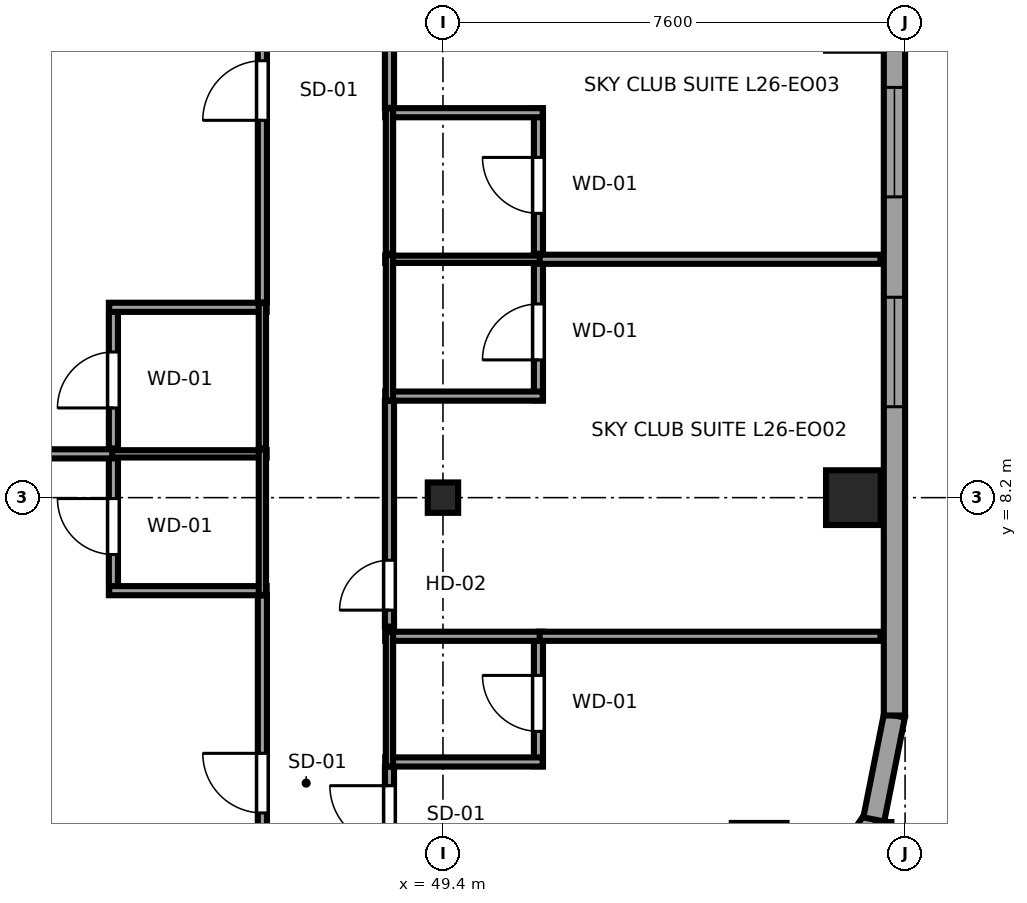
"""IFC4 building model, lengths in metres.
Left out: names, types, materials, properties, quantities, classifications, styles, units other than length and angle.
Written with IfcOpenShell. Run it as: python <this file> out.ifc"""

import sys

from ifc_helpers import new_model, si_unit, direction, frame, frame_2d, origin, origin_2d, place, context, subcontext, project, spatial, rectangle, i_section, extrude, source, transform, mapped, element, fill, save


model = new_model("IFC4")
c1 = context("Model", 3, precision=1e-05, world=origin(), true_north=direction((0.0, 1.0)))
c2 = subcontext(c1, "Body", "Model", "MODEL_VIEW")
j1 = project(units=[si_unit("LENGTHUNIT", "METRE"), si_unit("PLANEANGLEUNIT", "RADIAN")], contexts=[c1])
p1 = place(None, origin())
s1 = spatial("IfcSite", under=j1, at=p1, CompositionType="ELEMENT")
p2 = place(p1, origin())
s2 = spatial("IfcBuilding", under=s1, at=p2, CompositionType="ELEMENT")
p3 = place(p2, frame((0.0, 0.0, 104.45)))
s3 = spatial("IfcBuildingStorey", under=s2, at=p3, CompositionType="ELEMENT", Elevation=104.45)
m1 = source(origin(), c2, "Body", "SweptSolid", [
    extrude(i_section(OverallWidth=0.5, OverallDepth=0.5, WebThickness=0.022, FlangeThickness=0.034, at=origin_2d()), origin(), (0.0, 0.0, 1.0), 3.55),
])
p4 = place(p3, frame((49.4, 8.2, 0.0), z_axis=(0.0, 0.0, 1.0), x_axis=(1.0, 0.0, 0.0)))
e1 = element("IfcColumn", 1, at=p4, inside=s3, PredefinedType="COLUMN", context=c2, shape_type="MappedRepresentation", body=[
    mapped(m1, transform((0.0, 0.0, 0.0), x_axis=(1.0, 0.0, 0.0), y_axis=(0.0, 1.0, 0.0), z_axis=(0.0, 0.0, 1.0), scale=1.0)),
])
m2 = source(origin(), c2, "Body", "SweptSolid", [
    extrude(rectangle(XDim=0.9, YDim=0.9, at=origin_2d()), origin(), (0.0, 0.0, 1.0), 3.55),
])
p5 = place(p3, frame((56.15, 8.2, 0.0), z_axis=(0.0, 0.0, 1.0), x_axis=(1.0, 0.0, 0.0)))
e2 = element("IfcColumn", 2, at=p5, inside=s3, PredefinedType="COLUMN", context=c2, shape_type="MappedRepresentation", body=[
    mapped(m2, transform((0.0, 0.0, 0.0), x_axis=(1.0, 0.0, 0.0), y_axis=(0.0, 1.0, 0.0), z_axis=(0.0, 0.0, 1.0), scale=1.0)),
])
p6 = place(p3, frame((55.527, 1.473, 0.0), z_axis=(0.0, 0.0, 1.0), x_axis=(0.55554893791, 0.831483840845, 0.0)))
e3 = element("IfcWall", 3, at=p6, inside=s3, PredefinedType="SOLIDWALL", context=c2, shape_type="SweptSolid", body=[
    extrude(rectangle(XDim=1.725, YDim=0.35, at=frame_2d((0.863, 0.0))), origin(), (0.0, 0.0, 1.0), 2.832),
])
p7 = place(p3, frame((56.485, 2.908, 0.0), z_axis=(0.0, 0.0, 1.0), x_axis=(0.195011420161, 0.980800971659, 0.0)))
e4 = element("IfcWall", 4, at=p7, inside=s3, PredefinedType="SOLIDWALL", context=c2, shape_type="SweptSolid", body=[
    extrude(rectangle(XDim=1.743, YDim=0.35, at=frame_2d((0.871, 0.0))), origin(), (0.0, 0.0, 1.0), 3.37),
])
p8 = place(p3, frame((56.825, 4.617, 0.0), z_axis=(0.0, 0.0, 1.0), x_axis=(0.0, 1.0, 0.0)))
e5 = element("IfcWall", 5, at=p8, inside=s3, PredefinedType="SOLIDWALL", context=c2, shape_type="SweptSolid", body=[
    extrude(rectangle(XDim=36.766, YDim=0.35, at=frame_2d((18.383, 0.0))), origin(), (0.0, 0.0, 1.0), 3.37),
])
p9 = place(p8, frame((5.078, 0.0, 0.68)))
e6 = element("IfcOpeningElement", 6, at=p9, cuts=e5, PredefinedType="OPENING", context=c2, shape_type="SweptSolid", body=[
    extrude(rectangle(XDim=1.8, YDim=1.85, at=frame_2d((0.9, 0.925))), frame((0.0, 0.185, 0.0), z_axis=(0.0, -1.0, 0.0), x_axis=(1.0, 0.0, 0.0)), (0.0, 0.0, 1.0), 0.37),
])
p10 = place(p8, frame((8.529, 0.0, 0.68)))
e7 = element("IfcOpeningElement", 7, at=p10, cuts=e5, PredefinedType="OPENING", context=c2, shape_type="SweptSolid", body=[
    extrude(rectangle(XDim=1.8, YDim=1.85, at=frame_2d((0.9, 0.925))), frame((0.0, 0.185, 0.0), z_axis=(0.0, -1.0, 0.0), x_axis=(1.0, 0.0, 0.0)), (0.0, 0.0, 1.0), 0.37),
])
p11 = place(p8, frame((14.081, 0.0, 0.68)))
e8 = element("IfcOpeningElement", 8, at=p11, cuts=e5, PredefinedType="OPENING", context=c2, shape_type="SweptSolid", body=[
    extrude(rectangle(XDim=1.8, YDim=1.85, at=frame_2d((0.9, 0.925))), frame((0.0, 0.185, 0.0), z_axis=(0.0, -1.0, 0.0), x_axis=(1.0, 0.0, 0.0)), (0.0, 0.0, 1.0), 0.37),
])
p12 = place(p8, frame((16.933, 0.0, 0.68)))
e9 = element("IfcOpeningElement", 9, at=p12, cuts=e5, PredefinedType="OPENING", context=c2, shape_type="SweptSolid", body=[
    extrude(rectangle(XDim=1.8, YDim=1.85, at=frame_2d((0.9, 0.925))), frame((0.0, 0.185, 0.0), z_axis=(0.0, -1.0, 0.0), x_axis=(1.0, 0.0, 0.0)), (0.0, 0.0, 1.0), 0.37),
])
p13 = place(p8, frame((21.435, 0.0, 0.68)))
e10 = element("IfcOpeningElement", 10, at=p13, cuts=e5, PredefinedType="OPENING", context=c2, shape_type="SweptSolid", body=[
    extrude(rectangle(XDim=1.8, YDim=1.85, at=frame_2d((0.9, 0.925))), frame((0.0, 0.185, 0.0), z_axis=(0.0, -1.0, 0.0), x_axis=(1.0, 0.0, 0.0)), (0.0, 0.0, 1.0), 0.37),
])
p14 = place(p8, frame((25.386, 0.0, 0.68)))
e11 = element("IfcOpeningElement", 11, at=p14, cuts=e5, PredefinedType="OPENING", context=c2, shape_type="SweptSolid", body=[
    extrude(rectangle(XDim=1.8, YDim=1.85, at=frame_2d((0.9, 0.925))), frame((0.0, 0.185, 0.0), z_axis=(0.0, -1.0, 0.0), x_axis=(1.0, 0.0, 0.0)), (0.0, 0.0, 1.0), 0.37),
])
p15 = place(p8, frame((33.29, 0.0, 0.68)))
e12 = element("IfcOpeningElement", 12, at=p15, cuts=e5, PredefinedType="OPENING", context=c2, shape_type="SweptSolid", body=[
    extrude(rectangle(XDim=1.8, YDim=1.85, at=frame_2d((0.9, 0.925))), frame((0.0, 0.185, 0.0), z_axis=(0.0, -1.0, 0.0), x_axis=(1.0, 0.0, 0.0)), (0.0, 0.0, 1.0), 0.37),
])
p16 = place(p3, frame((43.98, 6.6, 0.0), z_axis=(0.0, 0.0, 1.0), x_axis=(0.0, 1.0, 0.0)))
e13 = element("IfcWall", 13, at=p16, inside=s3, PredefinedType="PARTITIONING", context=c2, shape_type="SweptSolid", body=[
    extrude(rectangle(XDim=2.39, YDim=0.15, at=frame_2d((1.195, 0.0))), origin(), (0.0, 0.0, 1.0), 3.37),
])
p17 = place(p16, frame((0.665, 0.0, 0.0)))
e14 = element("IfcOpeningElement", 14, at=p17, cuts=e13, PredefinedType="OPENING", context=c2, shape_type="SweptSolid", body=[
    extrude(rectangle(XDim=0.92, YDim=2.01, at=frame_2d((0.46, 1.005))), frame((0.0, 0.085, 0.0), z_axis=(0.0, -1.0, 0.0), x_axis=(1.0, 0.0, 0.0)), (0.0, 0.0, 1.0), 0.17),
])
p18 = place(p3, frame((43.91, 6.67, 0.0), z_axis=(0.0, 0.0, 1.0), x_axis=(1.0, 0.0, 0.0)))
e15 = element("IfcWall", 15, at=p18, inside=s3, PredefinedType="PARTITIONING", context=c2, shape_type="SweptSolid", body=[
    extrude(rectangle(XDim=2.59, YDim=0.15, at=frame_2d((1.295, 0.0))), origin(), (0.0, 0.0, 1.0), 3.37),
])
p19 = place(p3, frame((43.91, 8.92, 0.0), z_axis=(0.0, 0.0, 1.0), x_axis=(1.0, 0.0, 0.0)))
e16 = element("IfcWall", 16, at=p19, inside=s3, PredefinedType="PLUMBINGWALL", context=c2, shape_type="SweptSolid", body=[
    extrude(rectangle(XDim=2.59, YDim=0.12, at=frame_2d((1.295, 0.0))), origin(), (0.0, 0.0, 1.0), 3.37),
])
p20 = place(p3, frame((46.43, 6.6, 0.0), z_axis=(0.0, 0.0, 1.0), x_axis=(0.0, 1.0, 0.0)))
e17 = element("IfcWall", 17, at=p20, inside=s3, PredefinedType="PLUMBINGWALL", context=c2, shape_type="SweptSolid", body=[
    extrude(rectangle(XDim=2.39, YDim=0.12, at=frame_2d((1.195, 0.0))), origin(), (0.0, 0.0, 1.0), 3.37),
])
p21 = place(p3, frame((43.98, 9.01, 0.0), z_axis=(0.0, 0.0, 1.0), x_axis=(0.0, 1.0, 0.0)))
e18 = element("IfcWall", 18, at=p21, inside=s3, PredefinedType="PARTITIONING", context=c2, shape_type="SweptSolid", body=[
    extrude(rectangle(XDim=2.39, YDim=0.15, at=frame_2d((1.195, 0.0))), origin(), (0.0, 0.0, 1.0), 3.37),
])
p22 = place(p21, frame((0.665, 0.0, 0.0)))
e19 = element("IfcOpeningElement", 19, at=p22, cuts=e18, PredefinedType="OPENING", context=c2, shape_type="SweptSolid", body=[
    extrude(rectangle(XDim=0.92, YDim=2.01, at=frame_2d((0.46, 1.005))), frame((0.0, 0.085, 0.0), z_axis=(0.0, -1.0, 0.0), x_axis=(1.0, 0.0, 0.0)), (0.0, 0.0, 1.0), 0.17),
])
p23 = place(p3, frame((43.91, 11.33, 0.0), z_axis=(0.0, 0.0, 1.0), x_axis=(1.0, 0.0, 0.0)))
e20 = element("IfcWall", 20, at=p23, inside=s3, PredefinedType="PARTITIONING", context=c2, shape_type="SweptSolid", body=[
    extrude(rectangle(XDim=2.59, YDim=0.15, at=frame_2d((1.295, 0.0))), origin(), (0.0, 0.0, 1.0), 3.37),
])
p24 = place(p3, frame((46.43, 9.01, 0.0), z_axis=(0.0, 0.0, 1.0), x_axis=(0.0, 1.0, 0.0)))
e21 = element("IfcWall", 21, at=p24, inside=s3, PredefinedType="PLUMBINGWALL", context=c2, shape_type="SweptSolid", body=[
    extrude(rectangle(XDim=2.39, YDim=0.12, at=frame_2d((1.195, 0.0))), origin(), (0.0, 0.0, 1.0), 3.37),
])
p25 = place(p3, frame((50.97, 3.783, 0.0), z_axis=(0.0, 0.0, 1.0), x_axis=(0.0, 1.0, 0.0)))
e22 = element("IfcWall", 22, at=p25, inside=s3, PredefinedType="PARTITIONING", context=c2, shape_type="SweptSolid", body=[
    extrude(rectangle(XDim=2.207, YDim=0.15, at=frame_2d((1.104, 0.0))), origin(), (0.0, 0.0, 1.0), 3.37),
])
p26 = place(p25, frame((0.573, 0.0, 0.0)))
e23 = element("IfcOpeningElement", 23, at=p26, cuts=e22, PredefinedType="OPENING", context=c2, shape_type="SweptSolid", body=[
    extrude(rectangle(XDim=0.92, YDim=2.01, at=frame_2d((0.46, 1.005))), frame((0.0, 0.085, 0.0), z_axis=(0.0, -1.0, 0.0), x_axis=(1.0, 0.0, 0.0)), (0.0, 0.0, 1.0), 0.17),
])
for number, where, z_axis, x_axis in (
    (24, (48.45, 3.853, 0.0), (0.0, 0.0, 1.0), (1.0, 0.0, 0.0)),
    (25, (48.45, 5.92, 0.0), (0.0, 0.0, 1.0), (1.0, 0.0, 0.0)),
):
    element("IfcWall", number, at=place(p3, frame(where, z_axis=z_axis, x_axis=x_axis)), inside=s3, PredefinedType="PARTITIONING", context=c2, shape_type="SweptSolid", body=[
        extrude(rectangle(XDim=2.59, YDim=0.15, at=frame_2d((1.295, 0.0))), origin(), (0.0, 0.0, 1.0), 3.37),
    ])
p27 = place(p3, frame((48.52, 3.783, 0.0), z_axis=(0.0, 0.0, 1.0), x_axis=(0.0, 1.0, 0.0)))
e26 = element("IfcWall", 26, at=p27, inside=s3, PredefinedType="PLUMBINGWALL", context=c2, shape_type="SweptSolid", body=[
    extrude(rectangle(XDim=2.207, YDim=0.12, at=frame_2d((1.104, 0.0))), origin(), (0.0, 0.0, 1.0), 3.37),
])
p28 = place(p3, frame((50.97, 9.8, 0.0), z_axis=(0.0, 0.0, 1.0), x_axis=(0.0, 1.0, 0.0)))
e27 = element("IfcWall", 27, at=p28, inside=s3, PredefinedType="PARTITIONING", context=c2, shape_type="SweptSolid", body=[
    extrude(rectangle(XDim=2.39, YDim=0.15, at=frame_2d((1.195, 0.0))), origin(), (0.0, 0.0, 1.0), 3.37),
])
p29 = place(p28, frame((0.665, 0.0, 0.0)))
e28 = element("IfcOpeningElement", 28, at=p29, cuts=e27, PredefinedType="OPENING", context=c2, shape_type="SweptSolid", body=[
    extrude(rectangle(XDim=0.92, YDim=2.01, at=frame_2d((0.46, 1.005))), frame((0.0, 0.085, 0.0), z_axis=(0.0, -1.0, 0.0), x_axis=(1.0, 0.0, 0.0)), (0.0, 0.0, 1.0), 0.17),
])
p30 = place(p3, frame((48.45, 9.87, 0.0), z_axis=(0.0, 0.0, 1.0), x_axis=(1.0, 0.0, 0.0)))
e29 = element("IfcWall", 29, at=p30, inside=s3, PredefinedType="PARTITIONING", context=c2, shape_type="SweptSolid", body=[
    extrude(rectangle(XDim=2.59, YDim=0.15, at=frame_2d((1.295, 0.0))), origin(), (0.0, 0.0, 1.0), 3.37),
])
p31 = place(p3, frame((48.45, 12.12, 0.0), z_axis=(0.0, 0.0, 1.0), x_axis=(1.0, 0.0, 0.0)))
e30 = element("IfcWall", 30, at=p31, inside=s3, PredefinedType="PLUMBINGWALL", context=c2, shape_type="SweptSolid", body=[
    extrude(rectangle(XDim=2.59, YDim=0.12, at=frame_2d((1.295, 0.0))), origin(), (0.0, 0.0, 1.0), 3.37),
])
p32 = place(p3, frame((48.52, 9.8, 0.0), z_axis=(0.0, 0.0, 1.0), x_axis=(0.0, 1.0, 0.0)))
e31 = element("IfcWall", 31, at=p32, inside=s3, PredefinedType="PLUMBINGWALL", context=c2, shape_type="SweptSolid", body=[
    extrude(rectangle(XDim=2.39, YDim=0.12, at=frame_2d((1.195, 0.0))), origin(), (0.0, 0.0, 1.0), 3.37),
])
p33 = place(p3, frame((50.97, 12.21, 0.0), z_axis=(0.0, 0.0, 1.0), x_axis=(0.0, 1.0, 0.0)))
e32 = element("IfcWall", 32, at=p33, inside=s3, PredefinedType="PARTITIONING", context=c2, shape_type="SweptSolid", body=[
    extrude(rectangle(XDim=2.39, YDim=0.15, at=frame_2d((1.195, 0.0))), origin(), (0.0, 0.0, 1.0), 3.37),
])
p34 = place(p33, frame((0.665, 0.0, 0.0)))
e33 = element("IfcOpeningElement", 33, at=p34, cuts=e32, PredefinedType="OPENING", context=c2, shape_type="SweptSolid", body=[
    extrude(rectangle(XDim=0.92, YDim=2.01, at=frame_2d((0.46, 1.005))), frame((0.0, 0.085, 0.0), z_axis=(0.0, -1.0, 0.0), x_axis=(1.0, 0.0, 0.0)), (0.0, 0.0, 1.0), 0.17),
])
p35 = place(p3, frame((48.45, 14.53, 0.0), z_axis=(0.0, 0.0, 1.0), x_axis=(1.0, 0.0, 0.0)))
e34 = element("IfcWall", 34, at=p35, inside=s3, PredefinedType="PARTITIONING", context=c2, shape_type="SweptSolid", body=[
    extrude(rectangle(XDim=2.59, YDim=0.15, at=frame_2d((1.295, 0.0))), origin(), (0.0, 0.0, 1.0), 3.37),
])
p36 = place(p3, frame((48.52, 12.21, 0.0), z_axis=(0.0, 0.0, 1.0), x_axis=(0.0, 1.0, 0.0)))
e35 = element("IfcWall", 35, at=p36, inside=s3, PredefinedType="PLUMBINGWALL", context=c2, shape_type="SweptSolid", body=[
    extrude(rectangle(XDim=2.39, YDim=0.12, at=frame_2d((1.195, 0.0))), origin(), (0.0, 0.0, 1.0), 3.37),
])
p37 = place(p3, frame((46.43, 0.405, 0.0), z_axis=(0.0, 0.0, 1.0), x_axis=(0.0, 1.0, 0.0)))
e36 = element("IfcWall", 36, at=p37, inside=s3, PredefinedType="PARTITIONING", context=c2, shape_type="SweptSolid", body=[
    extrude(rectangle(XDim=6.185, YDim=0.15, at=frame_2d((3.093, 0.0))), origin(), (0.0, 0.0, 1.0), 3.37),
])
p38 = place(p37, frame((2.61, 0.0, 0.0)))
e37 = element("IfcOpeningElement", 37, at=p38, cuts=e36, PredefinedType="OPENING", context=c2, shape_type="SweptSolid", body=[
    extrude(rectangle(XDim=0.98, YDim=2.12, at=frame_2d((0.49, 1.06))), frame((0.0, 0.085, 0.0), z_axis=(0.0, -1.0, 0.0), x_axis=(1.0, 0.0, 0.0)), (0.0, 0.0, 1.0), 0.17),
])
p39 = place(p3, frame((34.65, 8.92, 0.0), z_axis=(0.0, 0.0, 1.0), x_axis=(1.0, 0.0, 0.0)))
e38 = element("IfcWall", 38, at=p39, inside=s3, PredefinedType="PARTITIONING", context=c2, shape_type="SweptSolid", body=[
    extrude(rectangle(XDim=9.31, YDim=0.15, at=frame_2d((4.655, 0.0))), origin(), (0.0, 0.0, 1.0), 3.37),
])
p40 = place(p3, frame((46.43, 11.41, 0.0), z_axis=(0.0, 0.0, 1.0), x_axis=(0.0, 1.0, 0.0)))
e39 = element("IfcWall", 39, at=p40, inside=s3, PredefinedType="PARTITIONING", context=c2, shape_type="SweptSolid", body=[
    extrude(rectangle(XDim=7.01, YDim=0.15, at=frame_2d((3.505, 0.0))), origin(), (0.0, 0.0, 1.0), 3.37),
])
p41 = place(p40, frame((2.995, 0.0, 0.0)))
e40 = element("IfcOpeningElement", 40, at=p41, cuts=e39, PredefinedType="OPENING", context=c2, shape_type="SweptSolid", body=[
    extrude(rectangle(XDim=0.98, YDim=2.12, at=frame_2d((0.49, 1.06))), frame((0.0, 0.085, 0.0), z_axis=(0.0, -1.0, 0.0), x_axis=(1.0, 0.0, 0.0)), (0.0, 0.0, 1.0), 0.17),
])
p42 = place(p3, frame((48.52, 0.405, 0.0), z_axis=(0.0, 0.0, 1.0), x_axis=(0.0, 1.0, 0.0)))
e41 = element("IfcWall", 41, at=p42, inside=s3, PredefinedType="PARTITIONING", context=c2, shape_type="SweptSolid", body=[
    extrude(rectangle(XDim=3.368, YDim=0.15, at=frame_2d((1.684, 0.0))), origin(), (0.0, 0.0, 1.0), 3.37),
])
p43 = place(p42, frame((2.078, 0.0, 0.0)))
e42 = element("IfcOpeningElement", 42, at=p43, cuts=e41, PredefinedType="OPENING", context=c2, shape_type="SweptSolid", body=[
    extrude(rectangle(XDim=0.98, YDim=2.12, at=frame_2d((0.49, 1.06))), frame((0.0, 0.085, 0.0), z_axis=(0.0, -1.0, 0.0), x_axis=(1.0, 0.0, 0.0)), (0.0, 0.0, 1.0), 0.17),
])
p44 = place(p3, frame((56.7, 0.48, 0.0), z_axis=(0.0, 0.0, 1.0), x_axis=(0.0, 1.0, 0.0)))
e43 = element("IfcWall", 43, at=p44, inside=s3, PredefinedType="PARTITIONING", context=c2, shape_type="SweptSolid", body=[
    extrude(rectangle(XDim=2.385, YDim=0.15, at=frame_2d((1.192, 0.0))), origin(), (0.0, 0.0, 1.0), 3.37),
])
p45 = place(p3, frame((50.99, 5.92, 0.0), z_axis=(0.0, 0.0, 1.0), x_axis=(1.0, 0.0, 0.0)))
e44 = element("IfcWall", 44, at=p45, inside=s3, PredefinedType="PARTITIONING", context=c2, shape_type="SweptSolid", body=[
    extrude(rectangle(XDim=5.605, YDim=0.15, at=frame_2d((2.802, 0.0))), origin(), (0.0, 0.0, 1.0), 3.37),
])
p46 = place(p3, frame((48.52, 6.08, 0.0), z_axis=(0.0, 0.0, 1.0), x_axis=(0.0, 1.0, 0.0)))
e45 = element("IfcWall", 45, at=p46, inside=s3, PredefinedType="PARTITIONING", context=c2, shape_type="SweptSolid", body=[
    extrude(rectangle(XDim=3.71, YDim=0.15, at=frame_2d((1.855, 0.0))), origin(), (0.0, 0.0, 1.0), 3.37),
])
p47 = place(p46, frame((0.27, 0.0, 0.0)))
e46 = element("IfcOpeningElement", 46, at=p47, cuts=e45, PredefinedType="OPENING", context=c2, shape_type="SweptSolid", body=[
    extrude(rectangle(XDim=0.82, YDim=2.01, at=frame_2d((0.41, 1.005))), frame((0.0, 0.085, 0.0), z_axis=(0.0, -1.0, 0.0), x_axis=(1.0, 0.0, 0.0)), (0.0, 0.0, 1.0), 0.17),
])
p48 = place(p3, frame((50.99, 12.12, 0.0), z_axis=(0.0, 0.0, 1.0), x_axis=(1.0, 0.0, 0.0)))
e47 = element("IfcWall", 47, at=p48, inside=s3, PredefinedType="PARTITIONING", context=c2, shape_type="SweptSolid", body=[
    extrude(rectangle(XDim=5.605, YDim=0.15, at=frame_2d((2.802, 0.0))), origin(), (0.0, 0.0, 1.0), 3.37),
])
p49 = place(p3, frame((48.52, 14.61, 0.0), z_axis=(0.0, 0.0, 1.0), x_axis=(0.0, 1.0, 0.0)))
e48 = element("IfcWall", 48, at=p49, inside=s3, PredefinedType="PARTITIONING", context=c2, shape_type="SweptSolid", body=[
    extrude(rectangle(XDim=3.81, YDim=0.15, at=frame_2d((1.905, 0.0))), origin(), (0.0, 0.0, 1.0), 3.37),
])
p50 = place(p49, frame((2.52, 0.0, 0.0)))
e49 = element("IfcOpeningElement", 49, at=p50, cuts=e48, PredefinedType="OPENING", context=c2, shape_type="SweptSolid", body=[
    extrude(rectangle(XDim=0.98, YDim=2.12, at=frame_2d((0.49, 1.06))), frame((0.0, 0.085, 0.0), z_axis=(0.0, -1.0, 0.0), x_axis=(1.0, 0.0, 0.0)), (0.0, 0.0, 1.0), 0.17),
])
m3 = source(origin(), c2, "Body", "SweptSolid", [
    extrude(rectangle(XDim=1.8, YDim=1.85, at=frame_2d((0.9, 0.925))), frame((0.0, 0.09, 0.0), z_axis=(0.0, -1.0, 0.0), x_axis=(1.0, 0.0, 0.0)), (0.0, 0.0, 1.0), 0.06),
])
p51 = place(p9, origin())
e50 = element("IfcWindow", 50, at=p51, inside=s3, PartitioningType="TRIPLE_PANEL_HORIZONTAL", PredefinedType="WINDOW", context=c2, shape_type="MappedRepresentation", body=[
    mapped(m3, transform((0.0, 0.0, 0.0), x_axis=(1.0, 0.0, 0.0), y_axis=(0.0, 1.0, 0.0), z_axis=(0.0, 0.0, 1.0), scale=1.0)),
])
fill(e6, e50)
p52 = place(p10, origin())
e51 = element("IfcWindow", 51, at=p52, inside=s3, PartitioningType="TRIPLE_PANEL_HORIZONTAL", PredefinedType="WINDOW", context=c2, shape_type="MappedRepresentation", body=[
    mapped(m3, transform((0.0, 0.0, 0.0), x_axis=(1.0, 0.0, 0.0), y_axis=(0.0, 1.0, 0.0), z_axis=(0.0, 0.0, 1.0), scale=1.0)),
])
fill(e7, e51)
m4 = source(origin(), c2, "Body", "SweptSolid", [
    extrude(rectangle(XDim=0.92, YDim=2.01, at=frame_2d((0.46, 1.005))), frame((0.0, 0.025, 0.0), z_axis=(0.0, -1.0, 0.0), x_axis=(1.0, 0.0, 0.0)), (0.0, 0.0, 1.0), 0.05),
])
p53 = place(p17, origin())
e52 = element("IfcDoor", 52, at=p53, inside=s3, OperationType="SINGLE_SWING_RIGHT", PredefinedType="DOOR", context=c2, shape_type="MappedRepresentation", body=[
    mapped(m4, transform((0.0, 0.0, 0.0), x_axis=(1.0, 0.0, 0.0), y_axis=(0.0, 1.0, 0.0), z_axis=(0.0, 0.0, 1.0), scale=1.0)),
])
fill(e14, e52)
p54 = place(p22, origin())
e53 = element("IfcDoor", 53, at=p54, inside=s3, OperationType="SINGLE_SWING_LEFT", PredefinedType="DOOR", context=c2, shape_type="MappedRepresentation", body=[
    mapped(m4, transform((0.0, 0.0, 0.0), x_axis=(1.0, 0.0, 0.0), y_axis=(0.0, 1.0, 0.0), z_axis=(0.0, 0.0, 1.0), scale=1.0)),
])
fill(e19, e53)
p55 = place(p26, origin())
e54 = element("IfcDoor", 54, at=p55, inside=s3, OperationType="SINGLE_SWING_RIGHT", PredefinedType="DOOR", context=c2, shape_type="MappedRepresentation", body=[
    mapped(m4, transform((0.0, 0.0, 0.0), x_axis=(1.0, 0.0, 0.0), y_axis=(0.0, 1.0, 0.0), z_axis=(0.0, 0.0, 1.0), scale=1.0)),
])
fill(e23, e54)
p56 = place(p29, origin())
e55 = element("IfcDoor", 55, at=p56, inside=s3, OperationType="SINGLE_SWING_LEFT", PredefinedType="DOOR", context=c2, shape_type="MappedRepresentation", body=[
    mapped(m4, transform((0.0, 0.0, 0.0), x_axis=(1.0, 0.0, 0.0), y_axis=(0.0, 1.0, 0.0), z_axis=(0.0, 0.0, 1.0), scale=1.0)),
])
fill(e28, e55)
p57 = place(p34, origin())
e56 = element("IfcDoor", 56, at=p57, inside=s3, OperationType="SINGLE_SWING_RIGHT", PredefinedType="DOOR", context=c2, shape_type="MappedRepresentation", body=[
    mapped(m4, transform((0.0, 0.0, 0.0), x_axis=(1.0, 0.0, 0.0), y_axis=(0.0, 1.0, 0.0), z_axis=(0.0, 0.0, 1.0), scale=1.0)),
])
fill(e33, e56)
m5 = source(origin(), c2, "Body", "SweptSolid", [
    extrude(rectangle(XDim=0.98, YDim=2.12, at=frame_2d((0.49, 1.06))), frame((0.0, 0.025, 0.0), z_axis=(0.0, -1.0, 0.0), x_axis=(1.0, 0.0, 0.0)), (0.0, 0.0, 1.0), 0.05),
])
p58 = place(p38, origin())
e57 = element("IfcDoor", 57, at=p58, inside=s3, OperationType="SINGLE_SWING_RIGHT", PredefinedType="DOOR", context=c2, shape_type="MappedRepresentation", body=[
    mapped(m5, transform((0.0, 0.0, 0.0), x_axis=(1.0, 0.0, 0.0), y_axis=(0.0, 1.0, 0.0), z_axis=(0.0, 0.0, 1.0), scale=1.0)),
])
fill(e37, e57)
p59 = place(p41, origin())
e58 = element("IfcDoor", 58, at=p59, inside=s3, OperationType="SINGLE_SWING_LEFT", PredefinedType="DOOR", context=c2, shape_type="MappedRepresentation", body=[
    mapped(m5, transform((0.0, 0.0, 0.0), x_axis=(1.0, 0.0, 0.0), y_axis=(0.0, 1.0, 0.0), z_axis=(0.0, 0.0, 1.0), scale=1.0)),
])
fill(e40, e58)
p60 = place(p43, origin())
e59 = element("IfcDoor", 59, at=p60, inside=s3, OperationType="SINGLE_SWING_RIGHT", PredefinedType="DOOR", context=c2, shape_type="MappedRepresentation", body=[
    mapped(m5, transform((0.0, 0.0, 0.0), x_axis=(1.0, 0.0, 0.0), y_axis=(0.0, 1.0, 0.0), z_axis=(0.0, 0.0, 1.0), scale=1.0)),
])
fill(e42, e59)
m6 = source(origin(), c2, "Body", "SweptSolid", [
    extrude(rectangle(XDim=0.82, YDim=2.01, at=frame_2d((0.41, 1.005))), frame((0.0, 0.025, 0.0), z_axis=(0.0, -1.0, 0.0), x_axis=(1.0, 0.0, 0.0)), (0.0, 0.0, 1.0), 0.05),
])
p61 = place(p47, origin())
e60 = element("IfcDoor", 60, at=p61, inside=s3, OperationType="SINGLE_SWING_LEFT", PredefinedType="DOOR", context=c2, shape_type="MappedRepresentation", body=[
    mapped(m6, transform((0.0, 0.0, 0.0), x_axis=(1.0, 0.0, 0.0), y_axis=(0.0, 1.0, 0.0), z_axis=(0.0, 0.0, 1.0), scale=1.0)),
])
fill(e46, e60)
save(model, sys.argv[1])
